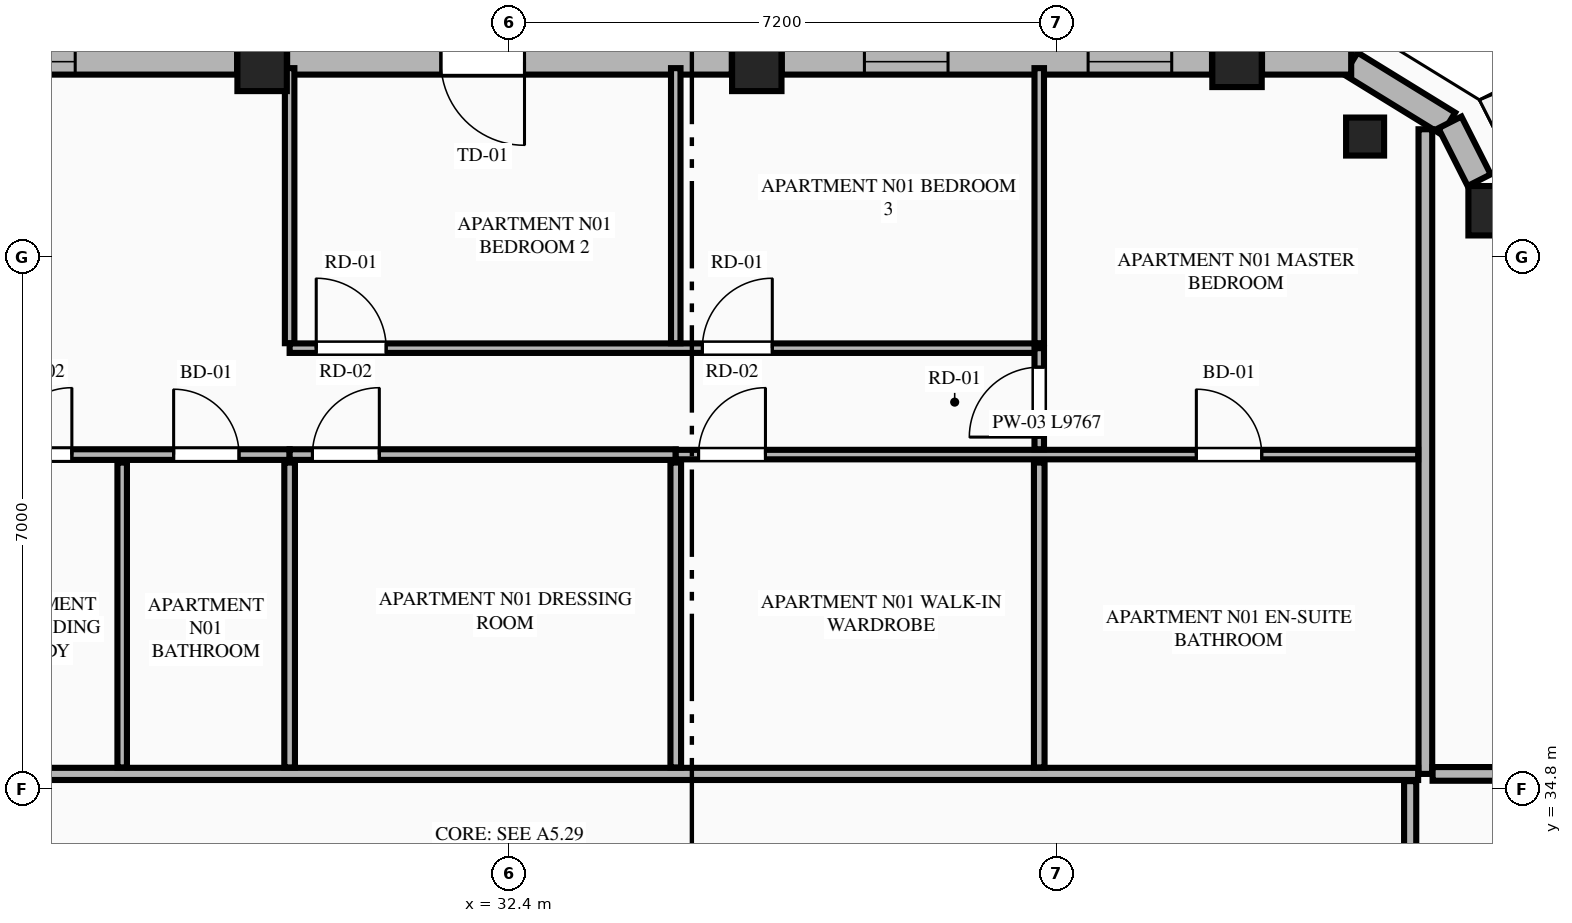
"""IFC4 building model, lengths in metres.
Left out: names, types, materials, properties, quantities, classifications, styles, units other than length and angle.
Written with IfcOpenShell. Run it as: python <this file> out.ifc"""

import sys

from ifc_helpers import new_model, si_unit, direction, frame, frame_2d, origin, origin_2d, place, context, subcontext, project, spatial, rectangle, extrude, element, fill, save


model = new_model("IFC4")
c1 = context("Model", 3, precision=1e-05, world=origin(), true_north=direction((0.0, 1.0)))
c2 = subcontext(c1, "Body", "Model", "MODEL_VIEW")
j1 = project(units=[si_unit("LENGTHUNIT", "METRE"), si_unit("PLANEANGLEUNIT", "RADIAN")], contexts=[c1])
p1 = place(None, origin())
s1 = spatial("IfcSite", under=j1, at=p1, CompositionType="ELEMENT")
p2 = place(p1, origin())
s2 = spatial("IfcBuilding", under=s1, at=p2, CompositionType="ELEMENT")
p3 = place(p2, frame((0.0, 0.0, 263.5)))
s3 = spatial("IfcBuildingStorey", under=s2, at=p3, CompositionType="ELEMENT", Elevation=263.5)
for number, where, z_axis, x_axis in (
    (1, (45.341, 42.409, 0.0), (0.0, 0.0, 1.0), (1.0, 0.0, 0.0)),
    (2, (41.972, 44.361, 0.0), (0.0, 0.0, 1.0), (1.0, 0.0, 0.0)),
    (3, (35.654, 44.308, 0.0), (0.0, 0.0, 1.0), (1.0, 0.0, 0.0)),
    (4, (29.146, 44.308, 0.0), (0.0, 0.0, 1.0), (1.0, 0.0, 0.0)),
):
    element("IfcColumn", number, at=place(p3, frame(where, z_axis=z_axis, x_axis=x_axis)), inside=s3, PredefinedType="COLUMN", context=c2, shape_type="SweptSolid", body=[
        extrude(rectangle(XDim=0.65, YDim=0.65, at=origin_2d()), origin(), (0.0, 0.0, 1.0), 3.65),
    ])
p4 = place(p3, frame((43.657, 43.385, 0.0), z_axis=(0.0, 0.0, 1.0), x_axis=(-0.865256437757, 0.501329529272, 0.0)))
e5 = element("IfcColumn", 5, at=p4, inside=s3, PredefinedType="PILASTER", context=c2, shape_type="SweptSolid", body=[
    extrude(rectangle(XDim=0.5, YDim=0.35, at=origin_2d()), origin(), (0.0, 0.0, 1.0), 3.65),
])
p5 = place(p3, frame((44.753, 43.555, 0.0), z_axis=(0.0, 0.0, 1.0), x_axis=(-0.851680557619, 0.52406128246, 0.0)))
e6 = element("IfcWall", 6, at=p5, inside=s3, PredefinedType="STANDARD", context=c2, shape_type="SweptSolid", body=[
    extrude(rectangle(XDim=1.508, YDim=0.34, at=frame_2d((0.754, 0.0))), origin(), (0.0, 0.0, 1.0), 3.45),
])
p6 = place(p3, frame((45.158, 42.811, 0.0), z_axis=(0.0, 0.0, 1.0), x_axis=(-0.451907025977, 0.8920650424, 0.0)))
e7 = element("IfcWall", 7, at=p6, inside=s3, PredefinedType="STANDARD", context=c2, shape_type="SweptSolid", body=[
    extrude(rectangle(XDim=0.852, YDim=0.34, at=frame_2d((0.426, 0.0))), origin(), (0.0, 0.0, 1.0), 3.45),
])
p7 = place(p3, frame((43.474, 44.37, 0.0), z_axis=(0.0, 0.0, 1.0), x_axis=(-1.0, 0.0, 0.0)))
e8 = element("IfcWall", 8, at=p7, inside=s3, PredefinedType="STANDARD", context=c2, shape_type="SweptSolid", body=[
    extrude(rectangle(XDim=1.173, YDim=0.34, at=frame_2d((0.586, 0.0))), origin(), (0.0, 0.0, 1.0), 3.45),
])
p8 = place(p3, frame((41.643, 44.37, 0.0), z_axis=(0.0, 0.0, 1.0), x_axis=(-1.0, 0.0, 0.0)))
e9 = element("IfcWall", 9, at=p8, inside=s3, PredefinedType="STANDARD", context=c2, shape_type="SweptSolid", body=[
    extrude(rectangle(XDim=5.66, YDim=0.34, at=frame_2d((2.83, 0.0))), origin(), (0.0, 0.0, 1.0), 2.983),
])
p9 = place(p8, frame((0.53, 0.0, 0.75)))
e10 = element("IfcOpeningElement", 10, at=p9, cuts=e9, PredefinedType="OPENING", context=c2, shape_type="SweptSolid", body=[
    extrude(rectangle(XDim=1.1, YDim=2.0, at=frame_2d((0.55, 1.0))), frame((0.0, 0.18, 0.0), z_axis=(0.0, -1.0, 0.0), x_axis=(1.0, 0.0, 0.0)), (0.0, 0.0, 1.0), 0.36),
])
p10 = place(p8, frame((3.473, 0.0, 0.75)))
e11 = element("IfcOpeningElement", 11, at=p10, cuts=e9, PredefinedType="OPENING", context=c2, shape_type="SweptSolid", body=[
    extrude(rectangle(XDim=1.1, YDim=2.0, at=frame_2d((0.55, 1.0))), frame((0.0, 0.18, 0.0), z_axis=(0.0, -1.0, 0.0), x_axis=(1.0, 0.0, 0.0)), (0.0, 0.0, 1.0), 0.36),
])
p11 = place(p3, frame((35.325, 44.37, 0.0), z_axis=(0.0, 0.0, 1.0), x_axis=(-1.0, 0.0, 0.0)))
e12 = element("IfcWall", 12, at=p11, inside=s3, PredefinedType="STANDARD", context=c2, shape_type="SweptSolid", body=[
    extrude(rectangle(XDim=5.85, YDim=0.34, at=frame_2d((2.925, 0.0))), origin(), (0.0, 0.0, 1.0), 2.983),
])
p12 = place(p11, frame((2.727, 0.0, 0.0)))
e13 = element("IfcOpeningElement", 13, at=p12, cuts=e12, PredefinedType="OPENING", context=c2, shape_type="SweptSolid", body=[
    extrude(rectangle(XDim=1.1, YDim=2.25, at=frame_2d((0.55, 1.125))), frame((0.0, 0.18, 0.0), z_axis=(0.0, -1.0, 0.0), x_axis=(1.0, 0.0, 0.0)), (0.0, 0.0, 1.0), 0.36),
])
p13 = place(p3, frame((28.817, 44.37, 0.0), z_axis=(0.0, 0.0, 1.0), x_axis=(-1.0, 0.0, 0.0)))
e14 = element("IfcWall", 14, at=p13, inside=s3, PredefinedType="STANDARD", context=c2, shape_type="SweptSolid", body=[
    extrude(rectangle(XDim=5.66, YDim=0.34, at=frame_2d((2.83, 0.0))), origin(), (0.0, 0.0, 1.0), 2.983),
])
p14 = place(p13, frame((2.13, 0.0, 0.75)))
e15 = element("IfcOpeningElement", 15, at=p14, cuts=e14, PredefinedType="OPENING", context=c2, shape_type="SweptSolid", body=[
    extrude(rectangle(XDim=1.4, YDim=2.05, at=frame_2d((0.7, 1.025))), frame((0.0, 0.18, 0.0), z_axis=(0.0, -1.0, 0.0), x_axis=(1.0, 0.0, 0.0)), (0.0, 0.0, 1.0), 0.36),
])
p15 = place(p3, frame((44.45, 35.0, 0.0), z_axis=(0.0, 0.0, 1.0), x_axis=(0.0, 1.0, 0.0)))
e16 = element("IfcWall", 16, at=p15, inside=s3, PredefinedType="PARTITIONING", context=c2, shape_type="SweptSolid", body=[
    extrude(rectangle(XDim=8.481, YDim=0.18, at=frame_2d((4.24, 0.0))), origin(), (0.0, 0.0, 1.0), 3.45),
])
p16 = place(p3, frame((20.445, 35.0, 0.0), z_axis=(0.0, 0.0, 1.0), x_axis=(1.0, 0.0, 0.0)))
e17 = element("IfcWall", 17, at=p16, inside=s3, PredefinedType="PARTITIONING", context=c2, shape_type="SweptSolid", body=[
    extrude(rectangle(XDim=23.91, YDim=0.16, at=frame_2d((11.955, 0.0))), origin(), (0.0, 0.0, 1.0), 3.45),
])
p17 = place(p16, frame((0.405, 0.0, 0.0)))
e18 = element("IfcOpeningElement", 18, at=p17, cuts=e17, PredefinedType="OPENING", context=c2, shape_type="SweptSolid", body=[
    extrude(rectangle(XDim=1.35, YDim=2.35, at=frame_2d((0.675, 1.175))), frame((0.0, 0.09, 0.0), z_axis=(0.0, -1.0, 0.0), x_axis=(1.0, 0.0, 0.0)), (0.0, 0.0, 1.0), 0.18),
])
p18 = place(p3, frame((22.4, 39.201, 0.0), z_axis=(0.0, 0.0, 1.0), x_axis=(1.0, 0.0, 0.0)))
e19 = element("IfcWall", 19, at=p18, inside=s3, PredefinedType="PLUMBINGWALL", context=c2, shape_type="SweptSolid", body=[
    extrude(rectangle(XDim=7.108, YDim=0.14, at=frame_2d((3.554, 0.0))), origin(), (0.0, 0.0, 1.0), 3.45),
])
p19 = place(p18, frame((5.582, 0.0, 0.0)))
e20 = element("IfcOpeningElement", 20, at=p19, cuts=e19, PredefinedType="OPENING", context=c2, shape_type="SweptSolid", body=[
    extrude(rectangle(XDim=0.86, YDim=2.1, at=frame_2d((0.43, 1.05))), frame((0.0, 0.08, 0.0), z_axis=(0.0, -1.0, 0.0), x_axis=(1.0, 0.0, 0.0)), (0.0, 0.0, 1.0), 0.16),
])
p20 = place(p18, frame((0.26, 0.0, 0.0)))
e21 = element("IfcOpeningElement", 21, at=p20, cuts=e19, PredefinedType="OPENING", context=c2, shape_type="SweptSolid", body=[
    extrude(rectangle(XDim=0.88, YDim=2.15, at=frame_2d((0.44, 1.075))), frame((0.0, 0.08, 0.0), z_axis=(0.0, -1.0, 0.0), x_axis=(1.0, 0.0, 0.0)), (0.0, 0.0, 1.0), 0.16),
])
p21 = place(p18, frame((3.363, 0.0, 0.0)))
e22 = element("IfcOpeningElement", 22, at=p21, cuts=e19, PredefinedType="OPENING", context=c2, shape_type="SweptSolid", body=[
    extrude(rectangle(XDim=0.88, YDim=2.15, at=frame_2d((0.44, 1.075))), frame((0.0, 0.08, 0.0), z_axis=(0.0, -1.0, 0.0), x_axis=(1.0, 0.0, 0.0)), (0.0, 0.0, 1.0), 0.16),
])
p22 = place(p3, frame((29.508, 39.201, 0.0), z_axis=(0.0, 0.0, 1.0), x_axis=(1.0, 0.0, 0.0)))
e23 = element("IfcWall", 23, at=p22, inside=s3, PredefinedType="PLUMBINGWALL", context=c2, shape_type="SweptSolid", body=[
    extrude(rectangle(XDim=5.08, YDim=0.14, at=frame_2d((2.54, 0.0))), origin(), (0.0, 0.0, 1.0), 3.45),
])
p23 = place(p22, frame((0.3, 0.0, 0.0)))
e24 = element("IfcOpeningElement", 24, at=p23, cuts=e23, PredefinedType="OPENING", context=c2, shape_type="SweptSolid", body=[
    extrude(rectangle(XDim=0.88, YDim=2.15, at=frame_2d((0.44, 1.075))), frame((0.0, 0.08, 0.0), z_axis=(0.0, -1.0, 0.0), x_axis=(1.0, 0.0, 0.0)), (0.0, 0.0, 1.0), 0.16),
])
p24 = place(p3, frame((34.588, 39.201, 0.0), z_axis=(0.0, 0.0, 1.0), x_axis=(1.0, 0.0, 0.0)))
e25 = element("IfcWall", 25, at=p24, inside=s3, PredefinedType="PARTITIONING", context=c2, shape_type="SweptSolid", body=[
    extrude(rectangle(XDim=9.767, YDim=0.125, at=frame_2d((4.884, 0.0))), origin(), (0.0, 0.0, 1.0), 3.45),
])
p25 = place(p24, frame((6.849, 0.0, 0.0)))
e26 = element("IfcOpeningElement", 26, at=p25, cuts=e25, PredefinedType="OPENING", context=c2, shape_type="SweptSolid", body=[
    extrude(rectangle(XDim=0.86, YDim=2.1, at=frame_2d((0.43, 1.05))), frame((0.0, 0.073, 0.0), z_axis=(0.0, -1.0, 0.0), x_axis=(1.0, 0.0, 0.0)), (0.0, 0.0, 1.0), 0.145),
])
p26 = place(p24, frame((0.3, 0.0, 0.0)))
e27 = element("IfcOpeningElement", 27, at=p26, cuts=e25, PredefinedType="OPENING", context=c2, shape_type="SweptSolid", body=[
    extrude(rectangle(XDim=0.88, YDim=2.15, at=frame_2d((0.44, 1.075))), frame((0.0, 0.073, 0.0), z_axis=(0.0, -1.0, 0.0), x_axis=(1.0, 0.0, 0.0)), (0.0, 0.0, 1.0), 0.145),
])
p27 = place(p3, frame((27.305, 35.085, 0.0), z_axis=(0.0, 0.0, 1.0), x_axis=(0.0, 1.0, 0.0)))
e28 = element("IfcWall", 28, at=p27, inside=s3, PredefinedType="PARTITIONING", context=c2, shape_type="SweptSolid", body=[
    extrude(rectangle(XDim=4.011, YDim=0.125, at=frame_2d((2.005, 0.0))), origin(), (0.0, 0.0, 1.0), 3.45),
])
p28 = place(p3, frame((29.508, 40.666, 0.0), z_axis=(0.0, 0.0, 1.0), x_axis=(0.0, 1.0, 0.0)))
e29 = element("IfcWall", 29, at=p28, inside=s3, PredefinedType="PARTITIONING", context=c2, shape_type="SweptSolid", body=[
    extrude(rectangle(XDim=3.619, YDim=0.125, at=frame_2d((1.81, 0.0))), origin(), (0.0, 0.0, 1.0), 3.45),
])
p29 = place(p3, frame((29.508, 40.601, 0.0), z_axis=(0.0, 0.0, 1.0), x_axis=(1.0, 0.0, 0.0)))
e30 = element("IfcWall", 30, at=p29, inside=s3, PredefinedType="PARTITIONING", context=c2, shape_type="SweptSolid", body=[
    extrude(rectangle(XDim=9.862, YDim=0.125, at=frame_2d((4.931, 0.0))), origin(), (0.0, 0.0, 1.0), 3.45),
])
p30 = place(p29, frame((0.35, 0.0, 0.0)))
e31 = element("IfcOpeningElement", 31, at=p30, cuts=e30, PredefinedType="OPENING", context=c2, shape_type="SweptSolid", body=[
    extrude(rectangle(XDim=0.92, YDim=2.15, at=frame_2d((0.46, 1.075))), frame((0.0, 0.073, 0.0), z_axis=(0.0, -1.0, 0.0), x_axis=(1.0, 0.0, 0.0)), (0.0, 0.0, 1.0), 0.145),
])
p31 = place(p29, frame((5.43, 0.0, 0.0)))
e32 = element("IfcOpeningElement", 32, at=p31, cuts=e30, PredefinedType="OPENING", context=c2, shape_type="SweptSolid", body=[
    extrude(rectangle(XDim=0.92, YDim=2.15, at=frame_2d((0.46, 1.075))), frame((0.0, 0.073, 0.0), z_axis=(0.0, -1.0, 0.0), x_axis=(1.0, 0.0, 0.0)), (0.0, 0.0, 1.0), 0.145),
])
p32 = place(p3, frame((39.37, 39.271, 0.0), z_axis=(0.0, 0.0, 1.0), x_axis=(0.0, 1.0, 0.0)))
e33 = element("IfcWall", 33, at=p32, inside=s3, PredefinedType="PARTITIONING", context=c2, shape_type="SweptSolid", body=[
    extrude(rectangle(XDim=1.33, YDim=0.125, at=frame_2d((0.665, 0.0))), origin(), (0.0, 0.0, 1.0), 3.45),
])
p33 = place(p32, frame((0.16, 0.0, 0.0)))
e34 = element("IfcOpeningElement", 34, at=p33, cuts=e33, PredefinedType="OPENING", context=c2, shape_type="SweptSolid", body=[
    extrude(rectangle(XDim=0.92, YDim=2.15, at=frame_2d((0.46, 1.075))), frame((0.0, 0.073, 0.0), z_axis=(0.0, -1.0, 0.0), x_axis=(1.0, 0.0, 0.0)), (0.0, 0.0, 1.0), 0.145),
])
for number, where, z_axis, x_axis in (
    (35, (29.508, 35.085, 0.0), (0.0, 0.0, 1.0), (0.0, 1.0, 0.0)),
    (36, (34.588, 35.085, 0.0), (0.0, 0.0, 1.0), (0.0, 1.0, 0.0)),
):
    element("IfcWall", number, at=place(p3, frame(where, z_axis=z_axis, x_axis=x_axis)), inside=s3, PredefinedType="PLUMBINGWALL", context=c2, shape_type="SweptSolid", body=[
        extrude(rectangle(XDim=4.011, YDim=0.14, at=frame_2d((2.005, 0.0))), origin(), (0.0, 0.0, 1.0), 3.45),
    ])
for number, where, z_axis, x_axis in (
    (37, (34.588, 40.666, 0.0), (0.0, 0.0, 1.0), (0.0, 1.0, 0.0)),
    (38, (39.37, 40.666, 0.0), (0.0, 0.0, 1.0), (0.0, 1.0, 0.0)),
):
    element("IfcWall", number, at=place(p3, frame(where, z_axis=z_axis, x_axis=x_axis)), inside=s3, PredefinedType="PARTITIONING", context=c2, shape_type="SweptSolid", body=[
        extrude(rectangle(XDim=3.619, YDim=0.125, at=frame_2d((1.81, 0.0))), origin(), (0.0, 0.0, 1.0), 3.45),
    ])
p34 = place(p3, frame((39.37, 35.085, 0.0), z_axis=(0.0, 0.0, 1.0), x_axis=(0.0, 1.0, 0.0)))
e39 = element("IfcWall", 39, at=p34, inside=s3, PredefinedType="PLUMBINGWALL", context=c2, shape_type="SweptSolid", body=[
    extrude(rectangle(XDim=4.011, YDim=0.14, at=frame_2d((2.005, 0.0))), origin(), (0.0, 0.0, 1.0), 3.45),
])
p35 = place(p3, frame((44.545, 35.0, 0.0), z_axis=(0.0, 0.0, 1.0), x_axis=(1.0, 0.0, 0.0)))
e40 = element("IfcWall", 40, at=p35, inside=s3, PredefinedType="PARTITIONING", context=c2, shape_type="SweptSolid", body=[
    extrude(rectangle(XDim=4.322, YDim=0.18, at=frame_2d((2.161, 0.0))), origin(), (0.0, 0.0, 1.0), 3.45),
])
p36 = place(p3, frame((44.25, 16.495, 0.0), z_axis=(0.0, 0.0, 1.0), x_axis=(0.0, 1.0, 0.0)))
e41 = element("IfcWall", 41, at=p36, inside=s3, PredefinedType="PARTITIONING", context=c2, shape_type="SweptSolid", body=[
    extrude(rectangle(XDim=18.41, YDim=0.16, at=frame_2d((9.205, 0.0))), origin(), (0.0, 0.0, 1.0), 3.137),
])
p37 = place(p36, frame((0.4, 0.0, 0.0)))
e42 = element("IfcOpeningElement", 42, at=p37, cuts=e41, PredefinedType="OPENING", context=c2, shape_type="SweptSolid", body=[
    extrude(rectangle(XDim=1.02, YDim=2.25, at=frame_2d((0.51, 1.125))), frame((0.0, 0.09, 0.0), z_axis=(0.0, -1.0, 0.0), x_axis=(1.0, 0.0, 0.0)), (0.0, 0.0, 1.0), 0.18),
])
p38 = place(p9, origin())
e43 = element("IfcWindow", 43, at=p38, inside=s3, PartitioningType="SINGLE_PANEL", PredefinedType="WINDOW", context=c2, shape_type="SweptSolid", body=[
    extrude(rectangle(XDim=1.1, YDim=2.0, at=frame_2d((0.55, 1.0))), frame((0.0, 0.03, 0.0), z_axis=(0.0, -1.0, 0.0), x_axis=(1.0, 0.0, 0.0)), (0.0, 0.0, 1.0), 0.06),
])
fill(e10, e43)
p39 = place(p12, origin())
e44 = element("IfcDoor", 44, at=p39, inside=s3, OperationType="SINGLE_SWING_LEFT", PredefinedType="DOOR", context=c2, shape_type="SweptSolid", body=[
    extrude(rectangle(XDim=1.1, YDim=2.25, at=frame_2d((0.55, 1.125))), frame((0.0, 0.025, 0.0), z_axis=(0.0, -1.0, 0.0), x_axis=(1.0, 0.0, 0.0)), (0.0, 0.0, 1.0), 0.05),
])
fill(e13, e44)
p40 = place(p14, origin())
e45 = element("IfcWindow", 45, at=p40, inside=s3, PartitioningType="SINGLE_PANEL", PredefinedType="WINDOW", context=c2, shape_type="SweptSolid", body=[
    extrude(rectangle(XDim=1.4, YDim=2.05, at=frame_2d((0.7, 1.025))), frame((0.0, 0.03, 0.0), z_axis=(0.0, -1.0, 0.0), x_axis=(1.0, 0.0, 0.0)), (0.0, 0.0, 1.0), 0.06),
])
fill(e15, e45)
p41 = place(p19, origin())
e46 = element("IfcDoor", 46, at=p41, inside=s3, OperationType="SINGLE_SWING_LEFT", PredefinedType="DOOR", context=c2, shape_type="SweptSolid", body=[
    extrude(rectangle(XDim=0.86, YDim=2.1, at=frame_2d((0.43, 1.05))), frame((0.0, 0.025, 0.0), z_axis=(0.0, -1.0, 0.0), x_axis=(1.0, 0.0, 0.0)), (0.0, 0.0, 1.0), 0.05),
])
fill(e20, e46)
p42 = place(p25, origin())
e47 = element("IfcDoor", 47, at=p42, inside=s3, OperationType="SINGLE_SWING_LEFT", PredefinedType="DOOR", context=c2, shape_type="SweptSolid", body=[
    extrude(rectangle(XDim=0.86, YDim=2.1, at=frame_2d((0.43, 1.05))), frame((0.0, 0.025, 0.0), z_axis=(0.0, -1.0, 0.0), x_axis=(1.0, 0.0, 0.0)), (0.0, 0.0, 1.0), 0.05),
])
fill(e26, e47)
p43 = place(p21, origin())
e48 = element("IfcDoor", 48, at=p43, inside=s3, OperationType="SINGLE_SWING_RIGHT", PredefinedType="DOOR", context=c2, shape_type="SweptSolid", body=[
    extrude(rectangle(XDim=0.88, YDim=2.15, at=frame_2d((0.44, 1.075))), frame((0.0, 0.025, 0.0), z_axis=(0.0, -1.0, 0.0), x_axis=(1.0, 0.0, 0.0)), (0.0, 0.0, 1.0), 0.05),
])
fill(e22, e48)
p44 = place(p23, origin())
e49 = element("IfcDoor", 49, at=p44, inside=s3, OperationType="SINGLE_SWING_RIGHT", PredefinedType="DOOR", context=c2, shape_type="SweptSolid", body=[
    extrude(rectangle(XDim=0.88, YDim=2.15, at=frame_2d((0.44, 1.075))), frame((0.0, 0.025, 0.0), z_axis=(0.0, -1.0, 0.0), x_axis=(1.0, 0.0, 0.0)), (0.0, 0.0, 1.0), 0.05),
])
fill(e24, e49)
p45 = place(p30, origin())
e50 = element("IfcDoor", 50, at=p45, inside=s3, OperationType="SINGLE_SWING_LEFT", PredefinedType="DOOR", context=c2, shape_type="SweptSolid", body=[
    extrude(rectangle(XDim=0.92, YDim=2.15, at=frame_2d((0.46, 1.075))), frame((0.0, 0.025, 0.0), z_axis=(0.0, -1.0, 0.0), x_axis=(1.0, 0.0, 0.0)), (0.0, 0.0, 1.0), 0.05),
])
fill(e31, e50)
p46 = place(p31, origin())
e51 = element("IfcDoor", 51, at=p46, inside=s3, OperationType="SINGLE_SWING_RIGHT", PredefinedType="DOOR", context=c2, shape_type="SweptSolid", body=[
    extrude(rectangle(XDim=0.92, YDim=2.15, at=frame_2d((0.46, 1.075))), frame((0.0, 0.025, 0.0), z_axis=(0.0, -1.0, 0.0), x_axis=(1.0, 0.0, 0.0)), (0.0, 0.0, 1.0), 0.05),
])
fill(e32, e51)
p47 = place(p33, origin())
e52 = element("IfcDoor", 52, at=p47, inside=s3, OperationType="SINGLE_SWING_LEFT", PredefinedType="DOOR", context=c2, shape_type="SweptSolid", body=[
    extrude(rectangle(XDim=0.92, YDim=2.15, at=frame_2d((0.46, 1.075))), frame((0.0, 0.025, 0.0), z_axis=(0.0, -1.0, 0.0), x_axis=(1.0, 0.0, 0.0)), (0.0, 0.0, 1.0), 0.05),
])
fill(e34, e52)
p48 = place(p26, origin())
e53 = element("IfcDoor", 53, at=p48, inside=s3, OperationType="SINGLE_SWING_RIGHT", PredefinedType="DOOR", context=c2, shape_type="SweptSolid", body=[
    extrude(rectangle(XDim=0.88, YDim=2.15, at=frame_2d((0.44, 1.075))), frame((0.0, 0.025, 0.0), z_axis=(0.0, -1.0, 0.0), x_axis=(1.0, 0.0, 0.0)), (0.0, 0.0, 1.0), 0.05),
])
fill(e27, e53)
p49 = place(p10, origin())
e54 = element("IfcWindow", 54, at=p49, inside=s3, PartitioningType="SINGLE_PANEL", PredefinedType="WINDOW", context=c2, shape_type="SweptSolid", body=[
    extrude(rectangle(XDim=1.1, YDim=2.0, at=frame_2d((0.55, 1.0))), frame((0.0, 0.03, 0.0), z_axis=(0.0, -1.0, 0.0), x_axis=(1.0, 0.0, 0.0)), (0.0, 0.0, 1.0), 0.06),
])
fill(e11, e54)
save(model, sys.argv[1])
